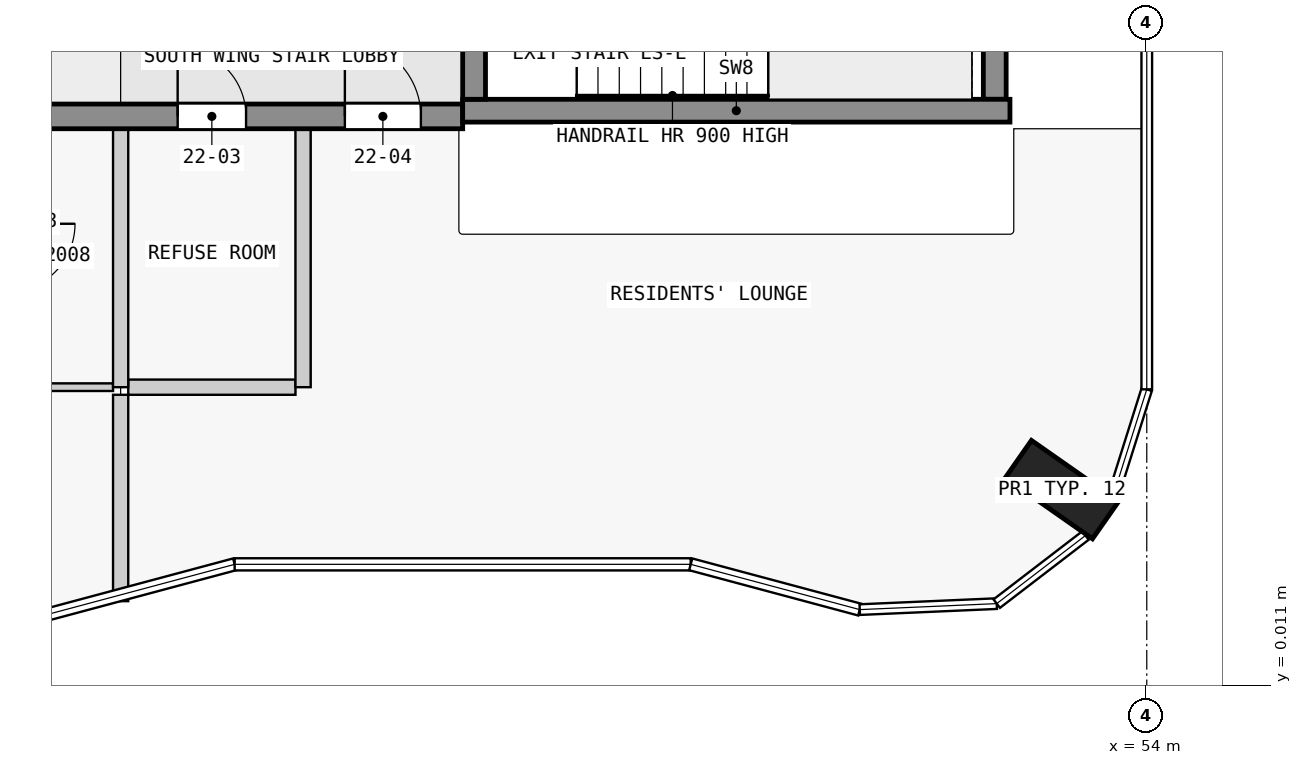
"""IFC4 building model, lengths in metres.
Left out: names, types, materials, properties, quantities, classifications, styles, units other than length and angle.
Written with IfcOpenShell. Run it as: python <this file> out.ifc"""

import sys

from ifc_helpers import new_model, si_unit, direction, frame, frame_2d, origin, origin_2d, place, context, subcontext, project, spatial, rectangle, extrude, element, fill, save


model = new_model("IFC4")
c1 = context("Model", 3, precision=1e-05, world=origin(), true_north=direction((0.0, 1.0)))
c2 = subcontext(c1, "Body", "Model", "MODEL_VIEW")
j1 = project(units=[si_unit("LENGTHUNIT", "METRE"), si_unit("PLANEANGLEUNIT", "RADIAN")], contexts=[c1])
p1 = place(None, origin())
s1 = spatial("IfcSite", under=j1, at=p1, CompositionType="ELEMENT")
p2 = place(p1, origin())
s2 = spatial("IfcBuilding", under=s1, at=p2, CompositionType="ELEMENT")
p3 = place(p2, frame((0.0, 0.0, 88.8)))
s3 = spatial("IfcBuildingStorey", under=s2, at=p3, CompositionType="ELEMENT", Elevation=88.8)
p4 = place(p3, frame((52.884, 2.59, 0.0), z_axis=(0.0, 0.0, 1.0), x_axis=(0.573542637991, 0.819175709117, 0.0)))
e1 = element("IfcColumn", 1, at=p4, inside=s3, PredefinedType="COLUMN", context=c2, shape_type="SweptSolid", body=[
    extrude(rectangle(XDim=0.6, YDim=1.4, at=origin_2d()), origin(), (0.0, 0.0, 1.0), 3.5),
])
p5 = place(p3, frame((45.15, 7.725, 0.0), z_axis=(0.0, 0.0, 1.0), x_axis=(0.0, 1.0, 0.0)))
e2 = element("IfcWall", 2, at=p5, inside=s3, PredefinedType="SHEAR", context=c2, shape_type="SweptSolid", body=[
    extrude(rectangle(XDim=2.55, YDim=0.3, at=frame_2d((1.275, 0.0))), origin(), (0.0, 0.0, 1.0), 3.5),
])
p6 = place(p5, frame((0.725, 0.0, 0.0)))
e3 = element("IfcOpeningElement", 3, at=p6, cuts=e2, PredefinedType="OPENING", context=c2, shape_type="SweptSolid", body=[
    extrude(rectangle(XDim=1.1, YDim=2.1, at=frame_2d((0.55, 1.05))), frame((0.0, 0.16, 0.0), z_axis=(0.0, -1.0, 0.0), x_axis=(1.0, 0.0, 0.0)), (0.0, 0.0, 1.0), 0.32),
])
p7 = place(p3, frame((52.0, 7.725, 0.0), z_axis=(0.0, 0.0, 1.0), x_axis=(0.0, 1.0, 0.0)))
e4 = element("IfcWall", 4, at=p7, inside=s3, PredefinedType="SHEAR", context=c2, shape_type="SweptSolid", body=[
    extrude(rectangle(XDim=2.55, YDim=0.3, at=frame_2d((1.275, 0.0))), origin(), (0.0, 0.0, 1.0), 3.5),
])
p8 = place(p3, frame((45.0, 7.575, 0.0), z_axis=(0.0, 0.0, 1.0), x_axis=(1.0, 0.0, 0.0)))
e5 = element("IfcWall", 5, at=p8, inside=s3, PredefinedType="SHEAR", context=c2, shape_type="SweptSolid", body=[
    extrude(rectangle(XDim=7.2, YDim=0.3, at=frame_2d((3.6, 0.0))), origin(), (0.0, 0.0, 1.0), 3.5),
])
p9 = place(p3, frame((22.5, 7.5, 0.0), z_axis=(0.0, 0.0, 1.0), x_axis=(1.0, 0.0, 0.0)))
e6 = element("IfcWall", 6, at=p9, inside=s3, PredefinedType="SHEAR", context=c2, shape_type="SweptSolid", body=[
    extrude(rectangle(XDim=22.5, YDim=0.325, at=frame_2d((11.25, 0.0))), origin(), (0.0, 0.0, 1.0), 3.25),
])
p10 = place(p9, frame((5.65, 0.0, 0.0)))
e7 = element("IfcOpeningElement", 7, at=p10, cuts=e6, PredefinedType="OPENING", context=c2, shape_type="SweptSolid", body=[
    extrude(rectangle(XDim=1.0, YDim=2.1, at=frame_2d((0.5, 1.05))), frame((0.0, 0.172, 0.0), z_axis=(0.0, -1.0, 0.0), x_axis=(1.0, 0.0, 0.0)), (0.0, 0.0, 1.0), 0.345),
])
p11 = place(p9, frame((15.25, 0.0, 0.0)))
e8 = element("IfcOpeningElement", 8, at=p11, cuts=e6, PredefinedType="OPENING", context=c2, shape_type="SweptSolid", body=[
    extrude(rectangle(XDim=1.0, YDim=2.1, at=frame_2d((0.5, 1.05))), frame((0.0, 0.172, 0.0), z_axis=(0.0, -1.0, 0.0), x_axis=(1.0, 0.0, 0.0)), (0.0, 0.0, 1.0), 0.345),
])
p12 = place(p9, frame((18.75, 0.0, 0.0)))
e9 = element("IfcOpeningElement", 9, at=p12, cuts=e6, PredefinedType="OPENING", context=c2, shape_type="SweptSolid", body=[
    extrude(rectangle(XDim=0.9, YDim=2.1, at=frame_2d((0.45, 1.05))), frame((0.0, 0.172, 0.0), z_axis=(0.0, -1.0, 0.0), x_axis=(1.0, 0.0, 0.0)), (0.0, 0.0, 1.0), 0.345),
])
p13 = place(p9, frame((20.95, 0.0, 0.0)))
e10 = element("IfcOpeningElement", 10, at=p13, cuts=e6, PredefinedType="OPENING", context=c2, shape_type="SweptSolid", body=[
    extrude(rectangle(XDim=1.0, YDim=2.1, at=frame_2d((0.5, 1.05))), frame((0.0, 0.172, 0.0), z_axis=(0.0, -1.0, 0.0), x_axis=(1.0, 0.0, 0.0)), (0.0, 0.0, 1.0), 0.345),
])
p14 = place(p3, frame((39.05, 3.938, 0.0), z_axis=(0.0, 0.0, 1.0), x_axis=(1.0, 0.0, 0.0)))
e11 = element("IfcWall", 11, at=p14, inside=s3, PredefinedType="PARTITIONING", context=c2, shape_type="SweptSolid", body=[
    extrude(rectangle(XDim=1.35, YDim=0.1, at=frame_2d((0.675, 0.0))), origin(), (0.0, 0.0, 1.0), 3.25),
])
p15 = place(p3, frame((40.6, 3.938, 0.0), z_axis=(0.0, 0.0, 1.0), x_axis=(1.0, 0.0, 0.0)))
e12 = element("IfcWall", 12, at=p15, inside=s3, PredefinedType="PARTITIONING", context=c2, shape_type="SweptSolid", body=[
    extrude(rectangle(XDim=2.2, YDim=0.2, at=frame_2d((1.1, 0.0))), origin(), (0.0, 0.0, 1.0), 3.25),
])
p16 = place(p3, frame((40.5, 3.837, 0.0), z_axis=(0.0, 0.0, 1.0), x_axis=(0.0, -1.0, 0.0)))
e13 = element("IfcWall", 13, at=p16, inside=s3, PredefinedType="PARTITIONING", context=c2, shape_type="SweptSolid", body=[
    extrude(rectangle(XDim=2.715, YDim=0.2, at=frame_2d((1.357, 0.0))), origin(), (0.0, 0.0, 1.0), 3.25),
])
for number, where, z_axis, x_axis in (
    (14, (40.5, 3.938, 0.0), (0.0, 0.0, 1.0), (0.0, 1.0, 0.0)),
    (15, (42.9, 3.938, 0.0), (0.0, 0.0, 1.0), (0.0, 1.0, 0.0)),
):
    element("IfcWall", number, at=place(p3, frame(where, z_axis=z_axis, x_axis=x_axis)), inside=s3, PredefinedType="PARTITIONING", context=c2, shape_type="SweptSolid", body=[
        extrude(rectangle(XDim=3.4, YDim=0.2, at=frame_2d((1.7, 0.0))), origin(), (0.0, 0.0, 1.0), 3.25),
    ])
p17 = place(p12, origin())
e16 = element("IfcDoor", 16, at=p17, inside=s3, OperationType="SINGLE_SWING_RIGHT", PredefinedType="DOOR", context=c2, shape_type="SweptSolid", body=[
    extrude(rectangle(XDim=0.9, YDim=2.1, at=frame_2d((0.45, 1.05))), frame((0.0, 0.025, 0.0), z_axis=(0.0, -1.0, 0.0), x_axis=(1.0, 0.0, 0.0)), (0.0, 0.0, 1.0), 0.05),
])
fill(e9, e16)
p18 = place(p13, origin())
e17 = element("IfcDoor", 17, at=p18, inside=s3, OperationType="SINGLE_SWING_RIGHT", PredefinedType="DOOR", context=c2, shape_type="SweptSolid", body=[
    extrude(rectangle(XDim=1.0, YDim=2.1, at=frame_2d((0.5, 1.05))), frame((0.0, 0.025, 0.0), z_axis=(0.0, -1.0, 0.0), x_axis=(1.0, 0.0, 0.0)), (0.0, 0.0, 1.0), 0.05),
])
fill(e10, e17)
save(model, sys.argv[1])
